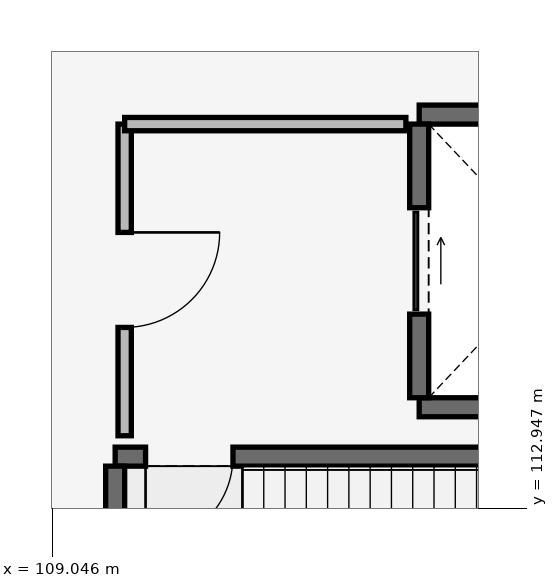
"""IFC4 building model, lengths in metres.
Left out: names, types, materials, properties, quantities, classifications, styles, units other than length and angle.
Written with IfcOpenShell. Run it as: python <this file> out.ifc"""

import sys

from ifc_helpers import new_model, si_unit, direction, frame, frame_2d, origin, place, context, subcontext, project, spatial, rectangle, extrude, element, fill, save


model = new_model("IFC4")
c1 = context("Model", 3, precision=1e-05, world=origin(), true_north=direction((0.0, 1.0)))
c2 = subcontext(c1, "Body", "Model", "MODEL_VIEW")
j1 = project(units=[si_unit("LENGTHUNIT", "METRE"), si_unit("PLANEANGLEUNIT", "RADIAN")], contexts=[c1])
p1 = place(None, origin())
s1 = spatial("IfcSite", under=j1, at=p1, CompositionType="ELEMENT")
p2 = place(p1, origin())
s2 = spatial("IfcBuilding", under=s1, at=p2, CompositionType="ELEMENT")
p3 = place(p2, origin())
s3 = spatial("IfcBuildingStorey", under=s2, at=p3, CompositionType="ELEMENT", Elevation=0.0)
p4 = place(p3, frame((109.875, 113.625, 0.0), z_axis=(0.0, 0.0, 1.0), x_axis=(1.0, 0.0, 0.0)))
e1 = element("IfcWall", 1, at=p4, inside=s3, PredefinedType="SHEAR", context=c2, shape_type="SweptSolid", body=[
    extrude(rectangle(XDim=7.27, YDim=0.25, at=frame_2d((3.635, 0.0))), origin(), (0.0, 0.0, 1.0), 5.08),
])
p5 = place(p4, frame((0.4, 0.0, 0.0)))
e2 = element("IfcOpeningElement", 2, at=p5, cuts=e1, PredefinedType="OPENING", context=c2, shape_type="SweptSolid", body=[
    extrude(rectangle(XDim=1.15, YDim=2.15, at=frame_2d((0.575, 1.075))), frame((0.0, 0.14, 0.0), z_axis=(0.0, -1.0, 0.0), x_axis=(1.0, 0.0, 0.0)), (0.0, 0.0, 1.0), 0.28),
])
p6 = place(p3, frame((109.875, 110.2, 0.0), z_axis=(0.0, 0.0, 1.0), x_axis=(0.0, 1.0, 0.0)))
e3 = element("IfcWall", 3, at=p6, inside=s3, PredefinedType="SHEAR", context=c2, shape_type="SweptSolid", body=[
    extrude(rectangle(XDim=3.3, YDim=0.25, at=frame_2d((1.65, 0.0))), origin(), (0.0, 0.0, 1.0), 5.08),
])
for number, where, z_axis, x_axis in (
    (4, (113.875, 114.275, 0.0), (0.0, 0.0, 1.0), (1.0, 0.0, 0.0)),
    (5, (113.875, 118.125, 0.0), (0.0, 0.0, 1.0), (1.0, 0.0, 0.0)),
):
    element("IfcWall", number, at=place(p3, frame(where, z_axis=z_axis, x_axis=x_axis)), inside=s3, PredefinedType="SHEAR", context=c2, shape_type="SweptSolid", body=[
        extrude(rectangle(XDim=3.65, YDim=0.25, at=frame_2d((1.825, 0.0))), origin(), (0.0, 0.0, 1.0), 5.08),
    ])
p7 = place(p3, frame((113.875, 114.4, 0.0), z_axis=(0.0, 0.0, 1.0), x_axis=(0.0, 1.0, 0.0)))
e6 = element("IfcWall", 6, at=p7, inside=s3, PredefinedType="SHEAR", context=c2, shape_type="SweptSolid", body=[
    extrude(rectangle(XDim=3.6, YDim=0.25, at=frame_2d((1.8, 0.0))), origin(), (0.0, 0.0, 1.0), 5.08),
])
p8 = place(p7, frame((1.1, 0.0, 0.0)))
e7 = element("IfcOpeningElement", 7, at=p8, cuts=e6, PredefinedType="OPENING", context=c2, shape_type="SweptSolid", body=[
    extrude(rectangle(XDim=1.4, YDim=2.2, at=frame_2d((0.7, 1.1))), frame((0.0, 0.14, 0.0), z_axis=(0.0, -1.0, 0.0), x_axis=(1.0, 0.0, 0.0)), (0.0, 0.0, 1.0), 0.28),
])
p9 = place(p3, frame((110.0, 113.9, 0.0), z_axis=(0.0, 0.0, 1.0), x_axis=(0.0, 1.0, 0.0)))
e8 = element("IfcWall", 8, at=p9, inside=s3, PredefinedType="PARTITIONING", context=c2, shape_type="SweptSolid", body=[
    extrude(rectangle(XDim=4.1, YDim=0.175, at=frame_2d((2.05, 0.0))), origin(), (0.0, 0.0, 1.0), 5.08),
])
p10 = place(p9, frame((1.425, 0.0, 0.0)))
e9 = element("IfcOpeningElement", 9, at=p10, cuts=e8, PredefinedType="OPENING", context=c2, shape_type="SweptSolid", body=[
    extrude(rectangle(XDim=1.25, YDim=2.2, at=frame_2d((0.625, 1.1))), frame((0.0, 0.103, 0.0), z_axis=(0.0, -1.0, 0.0), x_axis=(1.0, 0.0, 0.0)), (0.0, 0.0, 1.0), 0.205),
])
p11 = place(p3, frame((110.0, 118.0, 0.0), z_axis=(0.0, 0.0, 1.0), x_axis=(1.0, 0.0, 0.0)))
e10 = element("IfcWall", 10, at=p11, inside=s3, PredefinedType="PARTITIONING", context=c2, shape_type="SweptSolid", body=[
    extrude(rectangle(XDim=3.7, YDim=0.175, at=frame_2d((1.85, 0.0))), origin(), (0.0, 0.0, 1.0), 5.08),
])
p12 = place(p5, origin())
e11 = element("IfcDoor", 11, at=p12, inside=s3, OperationType="SINGLE_SWING_LEFT", PredefinedType="DOOR", context=c2, shape_type="SweptSolid", body=[
    extrude(rectangle(XDim=1.15, YDim=2.15, at=frame_2d((0.575, 1.075))), frame((0.0, 0.025, 0.0), z_axis=(0.0, -1.0, 0.0), x_axis=(1.0, 0.0, 0.0)), (0.0, 0.0, 1.0), 0.05),
])
fill(e2, e11)
p13 = place(p8, origin())
e12 = element("IfcDoor", 12, at=p13, inside=s3, OperationType="SLIDING_TO_RIGHT", PredefinedType="DOOR", context=c2, shape_type="SweptSolid", body=[
    extrude(rectangle(XDim=1.4, YDim=2.2, at=frame_2d((0.7, 1.1))), frame((0.0, 0.025, 0.0), z_axis=(0.0, -1.0, 0.0), x_axis=(1.0, 0.0, 0.0)), (0.0, 0.0, 1.0), 0.05),
])
fill(e7, e12)
p14 = place(p10, frame((1.25, 0.0, 0.0), z_axis=(0.0, 0.0, 1.0), x_axis=(-1.0, 0.0, 0.0)))
e13 = element("IfcDoor", 13, at=p14, inside=s3, OperationType="SINGLE_SWING_RIGHT", PredefinedType="DOOR", context=c2, shape_type="SweptSolid", body=[
    extrude(rectangle(XDim=1.25, YDim=2.2, at=frame_2d((0.625, 1.1))), frame((0.0, 0.025, 0.0), z_axis=(0.0, -1.0, 0.0), x_axis=(1.0, 0.0, 0.0)), (0.0, 0.0, 1.0), 0.05),
])
fill(e9, e13)
save(model, sys.argv[1])
